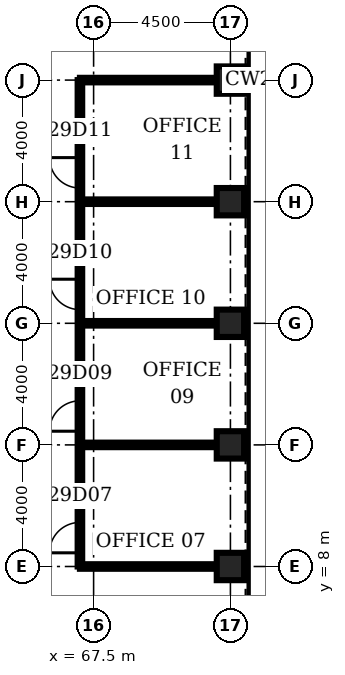
"""IFC4 building model, lengths in metres.
Left out: names, types, materials, properties, quantities, classifications, styles, units other than length and angle.
Written with IfcOpenShell. Run it as: python <this file> out.ifc"""

import sys

from ifc_helpers import new_model, si_unit, direction, frame, frame_2d, origin, origin_2d, place, context, subcontext, project, spatial, rectangle, hollow_rectangle, extrude, element, fill, save


model = new_model("IFC4")
c1 = context("Model", 3, precision=1e-05, world=origin(), true_north=direction((0.0, 1.0)))
c2 = subcontext(c1, "Body", "Model", "MODEL_VIEW")
j1 = project(units=[si_unit("LENGTHUNIT", "METRE"), si_unit("PLANEANGLEUNIT", "RADIAN")], contexts=[c1])
p1 = place(None, origin())
s1 = spatial("IfcSite", under=j1, at=p1, CompositionType="ELEMENT")
p2 = place(p1, origin())
s2 = spatial("IfcBuilding", under=s1, at=p2, CompositionType="ELEMENT")
p3 = place(p2, frame((0.0, 0.0, 134.1)))
s3 = spatial("IfcBuildingStorey", under=s2, at=p3, CompositionType="ELEMENT", Elevation=134.1)
for number, where, z_axis, x_axis in (
    (1, (72.0, 8.0, 0.0), (0.0, 0.0, 1.0), (1.0, 0.0, 0.0)),
    (2, (72.0, 12.0, 0.0), (0.0, 0.0, 1.0), (1.0, 0.0, 0.0)),
    (3, (72.0, 16.0, 0.0), (0.0, 0.0, 1.0), (1.0, 0.0, 0.0)),
    (4, (72.0, 20.0, 0.0), (0.0, 0.0, 1.0), (1.0, 0.0, 0.0)),
    (5, (72.0, 24.0, 0.0), (0.0, 0.0, 1.0), (1.0, 0.0, 0.0)),
):
    element("IfcColumn", number, at=place(p3, frame(where, z_axis=z_axis, x_axis=x_axis)), inside=s3, PredefinedType="COLUMN", context=c2, shape_type="SweptSolid", body=[
        extrude(hollow_rectangle(XDim=0.9, YDim=0.9, WallThickness=0.1, at=origin_2d()), origin(), (0.0, 0.0, 1.0), 4.2),
    ])
for number, where, z_axis, x_axis in (
    (6, (67.05, 8.0, 0.0), (0.0, 0.0, 1.0), (1.0, 0.0, 0.0)),
    (7, (67.05, 12.0, 0.0), (0.0, 0.0, 1.0), (1.0, 0.0, 0.0)),
    (8, (67.05, 16.0, 0.0), (0.0, 0.0, 1.0), (1.0, 0.0, 0.0)),
    (9, (67.05, 20.0, 0.0), (0.0, 0.0, 1.0), (1.0, 0.0, 0.0)),
    (10, (67.05, 24.0, 0.0), (0.0, 0.0, 1.0), (1.0, 0.0, 0.0)),
):
    element("IfcWall", number, at=place(p3, frame(where, z_axis=z_axis, x_axis=x_axis)), inside=s3, PredefinedType="PARTITIONING", context=c2, shape_type="SweptSolid", body=[
        extrude(rectangle(XDim=4.5, YDim=0.15, at=frame_2d((2.25, 0.0))), origin(), (0.0, 0.0, 1.0), 3.0),
    ])
p4 = place(p3, frame((67.05, 8.0, 0.0), z_axis=(0.0, 0.0, 1.0), x_axis=(0.0, 1.0, 0.0)))
e11 = element("IfcWall", 11, at=p4, inside=s3, PredefinedType="PARTITIONING", context=c2, shape_type="SweptSolid", body=[
    extrude(rectangle(XDim=16.0, YDim=0.15, at=frame_2d((8.0, 0.0))), origin(), (0.0, 0.0, 1.0), 3.0),
])
p5 = place(p4, frame((0.45, 0.0, 0.0)))
e12 = element("IfcOpeningElement", 12, at=p5, cuts=e11, PredefinedType="OPENING", context=c2, shape_type="SweptSolid", body=[
    extrude(rectangle(XDim=1.0, YDim=2.1, at=frame_2d((0.5, 1.05))), frame((0.0, 0.085, 0.0), z_axis=(0.0, -1.0, 0.0), x_axis=(1.0, 0.0, 0.0)), (0.0, 0.0, 1.0), 0.17),
])
p6 = place(p4, frame((4.45, 0.0, 0.0)))
e13 = element("IfcOpeningElement", 13, at=p6, cuts=e11, PredefinedType="OPENING", context=c2, shape_type="SweptSolid", body=[
    extrude(rectangle(XDim=1.0, YDim=2.1, at=frame_2d((0.5, 1.05))), frame((0.0, 0.085, 0.0), z_axis=(0.0, -1.0, 0.0), x_axis=(1.0, 0.0, 0.0)), (0.0, 0.0, 1.0), 0.17),
])
p7 = place(p4, frame((8.45, 0.0, 0.0)))
e14 = element("IfcOpeningElement", 14, at=p7, cuts=e11, PredefinedType="OPENING", context=c2, shape_type="SweptSolid", body=[
    extrude(rectangle(XDim=1.0, YDim=2.1, at=frame_2d((0.5, 1.05))), frame((0.0, 0.085, 0.0), z_axis=(0.0, -1.0, 0.0), x_axis=(1.0, 0.0, 0.0)), (0.0, 0.0, 1.0), 0.17),
])
p8 = place(p4, frame((12.45, 0.0, 0.0)))
e15 = element("IfcOpeningElement", 15, at=p8, cuts=e11, PredefinedType="OPENING", context=c2, shape_type="SweptSolid", body=[
    extrude(rectangle(XDim=1.0, YDim=2.1, at=frame_2d((0.5, 1.05))), frame((0.0, 0.085, 0.0), z_axis=(0.0, -1.0, 0.0), x_axis=(1.0, 0.0, 0.0)), (0.0, 0.0, 1.0), 0.17),
])
p9 = place(p5, origin())
e16 = element("IfcDoor", 16, at=p9, inside=s3, OperationType="SINGLE_SWING_LEFT", PredefinedType="DOOR", context=c2, shape_type="SweptSolid", body=[
    extrude(rectangle(XDim=1.0, YDim=2.1, at=frame_2d((0.5, 1.05))), frame((0.0, 0.025, 0.0), z_axis=(0.0, -1.0, 0.0), x_axis=(1.0, 0.0, 0.0)), (0.0, 0.0, 1.0), 0.05),
])
fill(e12, e16)
p10 = place(p6, origin())
e17 = element("IfcDoor", 17, at=p10, inside=s3, OperationType="SINGLE_SWING_LEFT", PredefinedType="DOOR", context=c2, shape_type="SweptSolid", body=[
    extrude(rectangle(XDim=1.0, YDim=2.1, at=frame_2d((0.5, 1.05))), frame((0.0, 0.025, 0.0), z_axis=(0.0, -1.0, 0.0), x_axis=(1.0, 0.0, 0.0)), (0.0, 0.0, 1.0), 0.05),
])
fill(e13, e17)
p11 = place(p7, origin())
e18 = element("IfcDoor", 18, at=p11, inside=s3, OperationType="SINGLE_SWING_RIGHT", PredefinedType="DOOR", context=c2, shape_type="SweptSolid", body=[
    extrude(rectangle(XDim=1.0, YDim=2.1, at=frame_2d((0.5, 1.05))), frame((0.0, 0.025, 0.0), z_axis=(0.0, -1.0, 0.0), x_axis=(1.0, 0.0, 0.0)), (0.0, 0.0, 1.0), 0.05),
])
fill(e14, e18)
p12 = place(p8, origin())
e19 = element("IfcDoor", 19, at=p12, inside=s3, OperationType="SINGLE_SWING_RIGHT", PredefinedType="DOOR", context=c2, shape_type="SweptSolid", body=[
    extrude(rectangle(XDim=1.0, YDim=2.1, at=frame_2d((0.5, 1.05))), frame((0.0, 0.025, 0.0), z_axis=(0.0, -1.0, 0.0), x_axis=(1.0, 0.0, 0.0)), (0.0, 0.0, 1.0), 0.05),
])
fill(e15, e19)
save(model, sys.argv[1])
